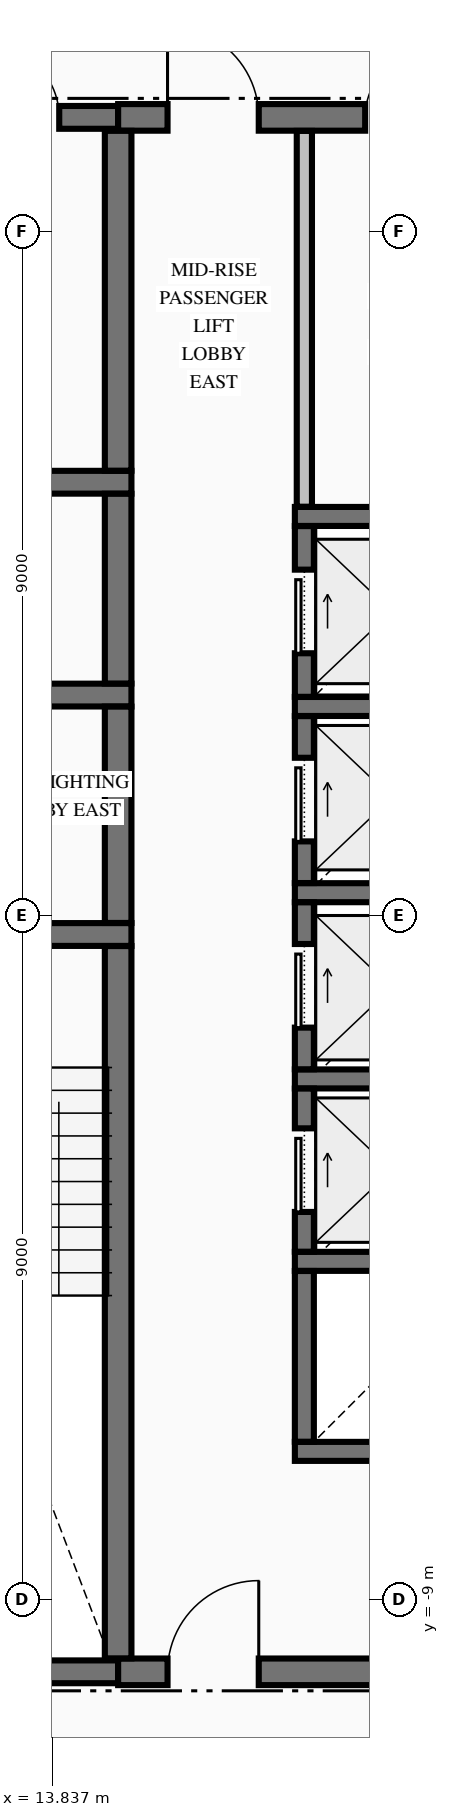
"""IFC4 building model, lengths in metres.
Left out: names, types, materials, properties, quantities, classifications, styles, units other than length and angle.
Written with IfcOpenShell. Run it as: python <this file> out.ifc"""

import sys

from ifc_helpers import new_model, si_unit, direction, frame, frame_2d, origin, place, context, subcontext, project, spatial, rectangle, extrude, element, fill, save


model = new_model("IFC4")
c1 = context("Model", 3, precision=1e-05, world=origin(), true_north=direction((0.0, 1.0)))
c2 = subcontext(c1, "Body", "Model", "MODEL_VIEW")
j1 = project(units=[si_unit("LENGTHUNIT", "METRE"), si_unit("PLANEANGLEUNIT", "RADIAN")], contexts=[c1])
p1 = place(None, origin())
s1 = spatial("IfcSite", under=j1, at=p1, CompositionType="ELEMENT")
p2 = place(p1, origin())
s2 = spatial("IfcBuilding", under=s1, at=p2, CompositionType="ELEMENT")
p3 = place(p2, frame((0.0, 0.0, 105.64)))
s3 = spatial("IfcBuildingStorey", under=s2, at=p3, CompositionType="ELEMENT", Elevation=105.64)
p4 = place(p3, frame((11.504, -9.95, 0.0), z_axis=(0.0, 0.0, 1.0), x_axis=(1.0, 0.0, 0.0)))
e1 = element("IfcWall", 1, at=p4, inside=s3, PredefinedType="SHEAR", context=c2, shape_type="SweptSolid", body=[
    extrude(rectangle(XDim=3.196, YDim=0.3, at=frame_2d((1.598, 0.0))), origin(), (0.0, 0.0, 1.0), 3.32),
])
p5 = place(p3, frame((14.7, -9.95, 0.0), z_axis=(0.0, 0.0, 1.0), x_axis=(1.0, 0.0, 0.0)))
e2 = element("IfcWall", 2, at=p5, inside=s3, PredefinedType="SHEAR", context=c2, shape_type="SweptSolid", body=[
    extrude(rectangle(XDim=4.796, YDim=0.35, at=frame_2d((2.398, 0.0))), origin(), (0.0, 0.0, 1.0), 3.32),
])
p6 = place(p5, frame((0.65, 0.0, 0.0)))
e3 = element("IfcOpeningElement", 3, at=p6, cuts=e2, PredefinedType="OPENING", context=c2, shape_type="SweptSolid", body=[
    extrude(rectangle(XDim=1.2, YDim=2.15, at=frame_2d((0.6, 1.075))), frame((0.0, 0.185, 0.0), z_axis=(0.0, -1.0, 0.0), x_axis=(1.0, 0.0, 0.0)), (0.0, 0.0, 1.0), 0.37),
])
for number, where, z_axis, x_axis in (
    (4, (17.025, -7.05, 0.0), (0.0, 0.0, 1.0), (1.0, 0.0, 0.0)),
    (5, (17.025, -4.55, 0.0), (0.0, 0.0, 1.0), (1.0, 0.0, 0.0)),
    (6, (17.025, -2.15, 0.0), (0.0, 0.0, 1.0), (1.0, 0.0, 0.0)),
):
    element("IfcWall", number, at=place(p3, frame(where, z_axis=z_axis, x_axis=x_axis)), inside=s3, PredefinedType="SOLIDWALL", context=c2, shape_type="SweptSolid", body=[
        extrude(rectangle(XDim=3.15, YDim=0.25, at=frame_2d((1.575, 0.0))), origin(), (0.0, 0.0, 1.0), 3.32),
    ])
p7 = place(p3, frame((11.504, -0.25, 0.0), z_axis=(0.0, 0.0, 1.0), x_axis=(1.0, 0.0, 0.0)))
e7 = element("IfcWall", 7, at=p7, inside=s3, PredefinedType="SHEAR", context=c2, shape_type="SweptSolid", body=[
    extrude(rectangle(XDim=3.371, YDim=0.3, at=frame_2d((1.686, 0.0))), origin(), (0.0, 0.0, 1.0), 3.32),
])
p8 = place(p7, frame((1.096, 0.0, 0.0)))
e8 = element("IfcOpeningElement", 8, at=p8, cuts=e7, PredefinedType="OPENING", context=c2, shape_type="SweptSolid", body=[
    extrude(rectangle(XDim=1.1, YDim=2.15, at=frame_2d((0.55, 1.075))), frame((0.0, 0.16, 0.0), z_axis=(0.0, -1.0, 0.0), x_axis=(1.0, 0.0, 0.0)), (0.0, 0.0, 1.0), 0.32),
])
p9 = place(p3, frame((17.025, 0.3, 0.0), z_axis=(0.0, 0.0, 1.0), x_axis=(1.0, 0.0, 0.0)))
e9 = element("IfcWall", 9, at=p9, inside=s3, PredefinedType="SOLIDWALL", context=c2, shape_type="SweptSolid", body=[
    extrude(rectangle(XDim=2.471, YDim=0.25, at=frame_2d((1.236, 0.0))), origin(), (0.0, 0.0, 1.0), 3.32),
])
p10 = place(p3, frame((17.025, 2.75, 0.0), z_axis=(0.0, 0.0, 1.0), x_axis=(1.0, 0.0, 0.0)))
e10 = element("IfcWall", 10, at=p10, inside=s3, PredefinedType="SOLIDWALL", context=c2, shape_type="SweptSolid", body=[
    extrude(rectangle(XDim=3.15, YDim=0.25, at=frame_2d((1.575, 0.0))), origin(), (0.0, 0.0, 1.0), 3.32),
])
p11 = place(p3, frame((10.85, 2.9, 0.0), z_axis=(0.0, 0.0, 1.0), x_axis=(1.0, 0.0, 0.0)))
e11 = element("IfcWall", 11, at=p11, inside=s3, PredefinedType="SHEAR", context=c2, shape_type="SweptSolid", body=[
    extrude(rectangle(XDim=4.025, YDim=0.3, at=frame_2d((2.012, 0.0))), origin(), (0.0, 0.0, 1.0), 3.32),
])
p12 = place(p11, frame((0.85, 0.0, 0.0)))
e12 = element("IfcOpeningElement", 12, at=p12, cuts=e11, PredefinedType="OPENING", context=c2, shape_type="SweptSolid", body=[
    extrude(rectangle(XDim=1.1, YDim=2.2, at=frame_2d((0.55, 1.1))), frame((0.0, 0.16, 0.0), z_axis=(0.0, -1.0, 0.0), x_axis=(1.0, 0.0, 0.0)), (0.0, 0.0, 1.0), 0.32),
])
p13 = place(p3, frame((17.025, 5.25, 0.0), z_axis=(0.0, 0.0, 1.0), x_axis=(1.0, 0.0, 0.0)))
e13 = element("IfcWall", 13, at=p13, inside=s3, PredefinedType="SOLIDWALL", context=c2, shape_type="SweptSolid", body=[
    extrude(rectangle(XDim=3.15, YDim=0.25, at=frame_2d((1.575, 0.0))), origin(), (0.0, 0.0, 1.0), 3.32),
])
p14 = place(p3, frame((10.85, 5.7, 0.0), z_axis=(0.0, 0.0, 1.0), x_axis=(1.0, 0.0, 0.0)))
e14 = element("IfcWall", 14, at=p14, inside=s3, PredefinedType="SHEAR", context=c2, shape_type="SweptSolid", body=[
    extrude(rectangle(XDim=4.025, YDim=0.3, at=frame_2d((2.012, 0.0))), origin(), (0.0, 0.0, 1.0), 3.32),
])
p15 = place(p3, frame((11.504, 10.5, 0.0), z_axis=(0.0, 0.0, 1.0), x_axis=(1.0, 0.0, 0.0)))
e15 = element("IfcWall", 15, at=p15, inside=s3, PredefinedType="SHEAR", context=c2, shape_type="SweptSolid", body=[
    extrude(rectangle(XDim=3.196, YDim=0.3, at=frame_2d((1.598, 0.0))), origin(), (0.0, 0.0, 1.0), 3.32),
])
p16 = place(p15, frame((1.471, 0.0, 0.0)))
e16 = element("IfcOpeningElement", 16, at=p16, cuts=e15, PredefinedType="OPENING", context=c2, shape_type="SweptSolid", body=[
    extrude(rectangle(XDim=0.95, YDim=2.15, at=frame_2d((0.475, 1.075))), frame((0.0, 0.16, 0.0), z_axis=(0.0, -1.0, 0.0), x_axis=(1.0, 0.0, 0.0)), (0.0, 0.0, 1.0), 0.32),
])
p17 = place(p3, frame((14.7, 10.5, 0.0), z_axis=(0.0, 0.0, 1.0), x_axis=(1.0, 0.0, 0.0)))
e17 = element("IfcWall", 17, at=p17, inside=s3, PredefinedType="SHEAR", context=c2, shape_type="SweptSolid", body=[
    extrude(rectangle(XDim=4.796, YDim=0.35, at=frame_2d((2.398, 0.0))), origin(), (0.0, 0.0, 1.0), 3.32),
])
p18 = place(p17, frame((0.65, 0.0, 0.0)))
e18 = element("IfcOpeningElement", 18, at=p18, cuts=e17, PredefinedType="OPENING", context=c2, shape_type="SweptSolid", body=[
    extrude(rectangle(XDim=1.2, YDim=2.15, at=frame_2d((0.6, 1.075))), frame((0.0, 0.185, 0.0), z_axis=(0.0, -1.0, 0.0), x_axis=(1.0, 0.0, 0.0)), (0.0, 0.0, 1.0), 0.37),
])
p19 = place(p17, frame((3.25, 0.0, 0.0)))
e19 = element("IfcOpeningElement", 19, at=p19, cuts=e17, PredefinedType="OPENING", context=c2, shape_type="SweptSolid", body=[
    extrude(rectangle(XDim=0.9, YDim=2.15, at=frame_2d((0.45, 1.075))), frame((0.0, 0.185, 0.0), z_axis=(0.0, -1.0, 0.0), x_axis=(1.0, 0.0, 0.0)), (0.0, 0.0, 1.0), 0.37),
])
p20 = place(p3, frame((14.7, -9.773, 0.0), z_axis=(0.0, 0.0, 1.0), x_axis=(0.0, 1.0, 0.0)))
e20 = element("IfcWall", 20, at=p20, inside=s3, PredefinedType="SHEAR", context=c2, shape_type="SweptSolid", body=[
    extrude(rectangle(XDim=9.371, YDim=0.35, at=frame_2d((4.686, 0.0))), origin(), (0.0, 0.0, 1.0), 3.32),
])
p21 = place(p3, frame((14.7, -0.098, 0.0), z_axis=(0.0, 0.0, 1.0), x_axis=(0.0, 1.0, 0.0)))
e21 = element("IfcWall", 21, at=p21, inside=s3, PredefinedType="SHEAR", context=c2, shape_type="SweptSolid", body=[
    extrude(rectangle(XDim=2.846, YDim=0.35, at=frame_2d((1.423, 0.0))), origin(), (0.0, 0.0, 1.0), 3.32),
])
p22 = place(p3, frame((14.7, 3.052, 0.0), z_axis=(0.0, 0.0, 1.0), x_axis=(0.0, 1.0, 0.0)))
e22 = element("IfcWall", 22, at=p22, inside=s3, PredefinedType="SHEAR", context=c2, shape_type="SweptSolid", body=[
    extrude(rectangle(XDim=2.496, YDim=0.35, at=frame_2d((1.248, 0.0))), origin(), (0.0, 0.0, 1.0), 3.32),
])
p23 = place(p3, frame((14.7, 5.852, 0.0), z_axis=(0.0, 0.0, 1.0), x_axis=(0.0, 1.0, 0.0)))
e23 = element("IfcWall", 23, at=p23, inside=s3, PredefinedType="SHEAR", context=c2, shape_type="SweptSolid", body=[
    extrude(rectangle(XDim=4.471, YDim=0.35, at=frame_2d((2.235, 0.0))), origin(), (0.0, 0.0, 1.0), 3.32),
])
p24 = place(p3, frame((17.15, -6.923, 0.0), z_axis=(0.0, 0.0, 1.0), x_axis=(0.0, 1.0, 0.0)))
e24 = element("IfcWall", 24, at=p24, inside=s3, PredefinedType="SOLIDWALL", context=c2, shape_type="SweptSolid", body=[
    extrude(rectangle(XDim=2.246, YDim=0.25, at=frame_2d((1.123, 0.0))), origin(), (0.0, 0.0, 1.0), 3.32),
])
p25 = place(p3, frame((17.15, -4.423, 0.0), z_axis=(0.0, 0.0, 1.0), x_axis=(0.0, 1.0, 0.0)))
e25 = element("IfcWall", 25, at=p25, inside=s3, PredefinedType="SOLIDWALL", context=c2, shape_type="SweptSolid", body=[
    extrude(rectangle(XDim=2.146, YDim=0.25, at=frame_2d((1.073, 0.0))), origin(), (0.0, 0.0, 1.0), 3.32),
])
p26 = place(p25, frame((0.523, 0.0, 0.0)))
e26 = element("IfcOpeningElement", 26, at=p26, cuts=e25, PredefinedType="OPENING", context=c2, shape_type="SweptSolid", body=[
    extrude(rectangle(XDim=1.1, YDim=2.2, at=frame_2d((0.55, 1.1))), frame((0.0, 0.135, 0.0), z_axis=(0.0, -1.0, 0.0), x_axis=(1.0, 0.0, 0.0)), (0.0, 0.0, 1.0), 0.27),
])
p27 = place(p3, frame((17.15, -2.023, 0.0), z_axis=(0.0, 0.0, 1.0), x_axis=(0.0, 1.0, 0.0)))
e27 = element("IfcWall", 27, at=p27, inside=s3, PredefinedType="SOLIDWALL", context=c2, shape_type="SweptSolid", body=[
    extrude(rectangle(XDim=2.196, YDim=0.25, at=frame_2d((1.098, 0.0))), origin(), (0.0, 0.0, 1.0), 3.32),
])
p28 = place(p27, frame((0.548, 0.0, 0.0)))
e28 = element("IfcOpeningElement", 28, at=p28, cuts=e27, PredefinedType="OPENING", context=c2, shape_type="SweptSolid", body=[
    extrude(rectangle(XDim=1.1, YDim=2.2, at=frame_2d((0.55, 1.1))), frame((0.0, 0.135, 0.0), z_axis=(0.0, -1.0, 0.0), x_axis=(1.0, 0.0, 0.0)), (0.0, 0.0, 1.0), 0.27),
])
p29 = place(p3, frame((17.15, 0.427, 0.0), z_axis=(0.0, 0.0, 1.0), x_axis=(0.0, 1.0, 0.0)))
e29 = element("IfcWall", 29, at=p29, inside=s3, PredefinedType="SOLIDWALL", context=c2, shape_type="SweptSolid", body=[
    extrude(rectangle(XDim=2.196, YDim=0.25, at=frame_2d((1.098, 0.0))), origin(), (0.0, 0.0, 1.0), 3.32),
])
p30 = place(p29, frame((0.548, 0.0, 0.0)))
e30 = element("IfcOpeningElement", 30, at=p30, cuts=e29, PredefinedType="OPENING", context=c2, shape_type="SweptSolid", body=[
    extrude(rectangle(XDim=1.1, YDim=2.2, at=frame_2d((0.55, 1.1))), frame((0.0, 0.135, 0.0), z_axis=(0.0, -1.0, 0.0), x_axis=(1.0, 0.0, 0.0)), (0.0, 0.0, 1.0), 0.27),
])
p31 = place(p3, frame((17.15, 2.877, 0.0), z_axis=(0.0, 0.0, 1.0), x_axis=(0.0, 1.0, 0.0)))
e31 = element("IfcWall", 31, at=p31, inside=s3, PredefinedType="SOLIDWALL", context=c2, shape_type="SweptSolid", body=[
    extrude(rectangle(XDim=2.246, YDim=0.25, at=frame_2d((1.123, 0.0))), origin(), (0.0, 0.0, 1.0), 3.32),
])
p32 = place(p31, frame((0.573, 0.0, 0.0)))
e32 = element("IfcOpeningElement", 32, at=p32, cuts=e31, PredefinedType="OPENING", context=c2, shape_type="SweptSolid", body=[
    extrude(rectangle(XDim=1.1, YDim=2.2, at=frame_2d((0.55, 1.1))), frame((0.0, 0.135, 0.0), z_axis=(0.0, -1.0, 0.0), x_axis=(1.0, 0.0, 0.0)), (0.0, 0.0, 1.0), 0.27),
])
p33 = place(p3, frame((17.15, 5.378, 0.0), z_axis=(0.0, 0.0, 1.0), x_axis=(0.0, 1.0, 0.0)))
e33 = element("IfcWall", 33, at=p33, inside=s3, PredefinedType="PARTITIONING", context=c2, shape_type="SweptSolid", body=[
    extrude(rectangle(XDim=4.944, YDim=0.2, at=frame_2d((2.472, 0.0))), origin(), (0.0, 0.0, 1.0), 3.32),
])
p34 = place(p16, origin())
e34 = element("IfcDoor", 34, at=p34, inside=s3, OperationType="SINGLE_SWING_LEFT", PredefinedType="DOOR", context=c2, shape_type="SweptSolid", body=[
    extrude(rectangle(XDim=0.95, YDim=2.15, at=frame_2d((0.475, 1.075))), frame((0.0, 0.025, 0.0), z_axis=(0.0, -1.0, 0.0), x_axis=(1.0, 0.0, 0.0)), (0.0, 0.0, 1.0), 0.05),
])
fill(e16, e34)
p35 = place(p26, origin())
e35 = element("IfcDoor", 35, at=p35, inside=s3, OperationType="SLIDING_TO_RIGHT", PredefinedType="DOOR", context=c2, shape_type="SweptSolid", body=[
    extrude(rectangle(XDim=1.1, YDim=2.2, at=frame_2d((0.55, 1.1))), frame((0.0, 0.025, 0.0), z_axis=(0.0, -1.0, 0.0), x_axis=(1.0, 0.0, 0.0)), (0.0, 0.0, 1.0), 0.05),
])
fill(e26, e35)
p36 = place(p28, origin())
e36 = element("IfcDoor", 36, at=p36, inside=s3, OperationType="SLIDING_TO_RIGHT", PredefinedType="DOOR", context=c2, shape_type="SweptSolid", body=[
    extrude(rectangle(XDim=1.1, YDim=2.2, at=frame_2d((0.55, 1.1))), frame((0.0, 0.025, 0.0), z_axis=(0.0, -1.0, 0.0), x_axis=(1.0, 0.0, 0.0)), (0.0, 0.0, 1.0), 0.05),
])
fill(e28, e36)
p37 = place(p30, origin())
e37 = element("IfcDoor", 37, at=p37, inside=s3, OperationType="SLIDING_TO_RIGHT", PredefinedType="DOOR", context=c2, shape_type="SweptSolid", body=[
    extrude(rectangle(XDim=1.1, YDim=2.2, at=frame_2d((0.55, 1.1))), frame((0.0, 0.025, 0.0), z_axis=(0.0, -1.0, 0.0), x_axis=(1.0, 0.0, 0.0)), (0.0, 0.0, 1.0), 0.05),
])
fill(e30, e37)
p38 = place(p32, origin())
e38 = element("IfcDoor", 38, at=p38, inside=s3, OperationType="SLIDING_TO_RIGHT", PredefinedType="DOOR", context=c2, shape_type="SweptSolid", body=[
    extrude(rectangle(XDim=1.1, YDim=2.2, at=frame_2d((0.55, 1.1))), frame((0.0, 0.025, 0.0), z_axis=(0.0, -1.0, 0.0), x_axis=(1.0, 0.0, 0.0)), (0.0, 0.0, 1.0), 0.05),
])
fill(e32, e38)
p39 = place(p6, origin())
e39 = element("IfcDoor", 39, at=p39, inside=s3, OperationType="SINGLE_SWING_RIGHT", PredefinedType="DOOR", context=c2, shape_type="SweptSolid", body=[
    extrude(rectangle(XDim=1.2, YDim=2.15, at=frame_2d((0.6, 1.075))), frame((0.0, 0.025, 0.0), z_axis=(0.0, -1.0, 0.0), x_axis=(1.0, 0.0, 0.0)), (0.0, 0.0, 1.0), 0.05),
])
fill(e3, e39)
p40 = place(p18, origin())
e40 = element("IfcDoor", 40, at=p40, inside=s3, OperationType="SINGLE_SWING_LEFT", PredefinedType="DOOR", context=c2, shape_type="SweptSolid", body=[
    extrude(rectangle(XDim=1.2, YDim=2.15, at=frame_2d((0.6, 1.075))), frame((0.0, 0.025, 0.0), z_axis=(0.0, -1.0, 0.0), x_axis=(1.0, 0.0, 0.0)), (0.0, 0.0, 1.0), 0.05),
])
fill(e18, e40)
p41 = place(p19, origin())
e41 = element("IfcDoor", 41, at=p41, inside=s3, OperationType="SINGLE_SWING_RIGHT", PredefinedType="DOOR", context=c2, shape_type="SweptSolid", body=[
    extrude(rectangle(XDim=0.9, YDim=2.15, at=frame_2d((0.45, 1.075))), frame((0.0, 0.025, 0.0), z_axis=(0.0, -1.0, 0.0), x_axis=(1.0, 0.0, 0.0)), (0.0, 0.0, 1.0), 0.05),
])
fill(e19, e41)
save(model, sys.argv[1])
